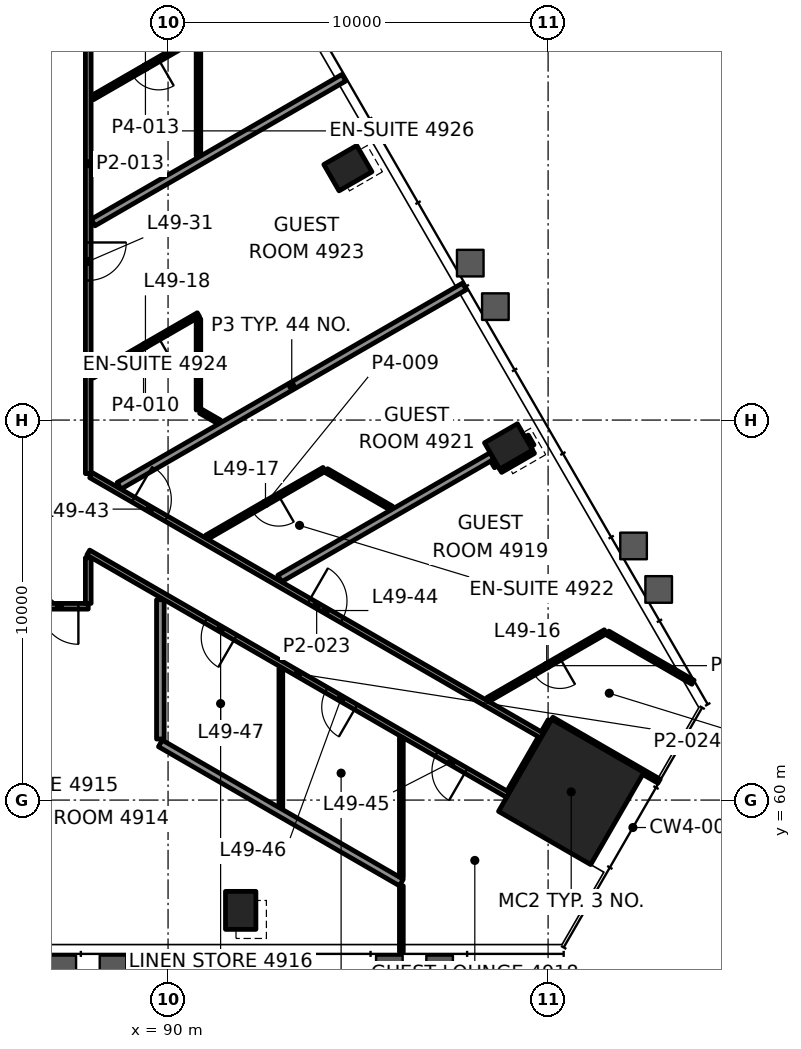
"""IFC4 building model, lengths in metres.
Left out: names, types, materials, properties, quantities, classifications, styles, units other than length and angle.
Written with IfcOpenShell. Run it as: python <this file> out.ifc"""

import sys

from ifc_helpers import new_model, si_unit, direction, frame, frame_2d, origin, origin_2d, place, context, subcontext, project, spatial, rectangle, hollow_rectangle, extrude, element, fill, save


model = new_model("IFC4")
c1 = context("Model", 3, precision=1e-05, world=origin(), true_north=direction((0.0, 1.0)))
c2 = subcontext(c1, "Body", "Model", "MODEL_VIEW")
j1 = project(units=[si_unit("LENGTHUNIT", "METRE"), si_unit("PLANEANGLEUNIT", "RADIAN")], contexts=[c1])
p1 = place(None, origin())
s1 = spatial("IfcSite", under=j1, at=p1, CompositionType="ELEMENT")
p2 = place(p1, origin())
s2 = spatial("IfcBuilding", under=s1, at=p2, CompositionType="ELEMENT")
p3 = place(p2, frame((0.0, 0.0, 210.4)))
s3 = spatial("IfcBuildingStorey", under=s2, at=p3, CompositionType="ELEMENT", Elevation=210.4)
p4 = place(p3, frame((100.608, 60.215, 0.0), z_axis=(0.0, 0.0, 1.0), x_axis=(0.5, 0.866025403784, 0.0)))
e1 = element("IfcColumn", 1, at=p4, inside=s3, PredefinedType="COLUMN", context=c2, shape_type="SweptSolid", body=[
    extrude(rectangle(XDim=2.8, YDim=2.8, at=origin_2d()), origin(), (0.0, 0.0, 1.0), 3.9),
])
for number, where, z_axis, x_axis in (
    (2, (91.911, 57.097, -0.0), (0.0, 0.0, 1.0), (1.0, 0.0, 0.0)),
    (3, (98.96, 69.306, -0.0), (0.0, 0.0, 1.0), (-0.5, 0.866, 0.0)),
    (4, (94.732, 76.628, -0.0), (0.0, 0.0, 1.0), (-0.5, 0.866, 0.0)),
):
    element("IfcColumn", number, at=place(p3, frame(where, z_axis=z_axis, x_axis=x_axis)), inside=s3, PredefinedType="COLUMN", context=c2, shape_type="SweptSolid", body=[
        extrude(hollow_rectangle(XDim=0.8, YDim=1.0, WallThickness=0.05, at=origin_2d()), origin(), (0.0, 0.0, 1.0), 3.9),
    ])
p5 = place(p3, frame((87.899, 65.1, 0.0), z_axis=(0.0, 0.0, 1.0), x_axis=(-1.0, 0.0, 0.0)))
e5 = element("IfcWall", 5, at=p5, inside=s3, PredefinedType="PARTITIONING", context=c2, shape_type="SweptSolid", body=[
    extrude(rectangle(XDim=25.799, YDim=0.15, at=frame_2d((12.899, 0.0))), origin(), (0.0, 0.0, 1.0), 3.1),
])
p6 = place(p5, frame((0.259, 0.0, 0.0)))
e6 = element("IfcOpeningElement", 6, at=p6, cuts=e5, PredefinedType="OPENING", context=c2, shape_type="SweptSolid", body=[
    extrude(rectangle(XDim=1.0, YDim=2.1, at=frame_2d((0.5, 1.05))), frame((0.0, 0.085, 0.0), z_axis=(0.0, -1.0, 0.0), x_axis=(1.0, 0.0, 0.0)), (0.0, 0.0, 1.0), 0.17),
])
p7 = place(p5, frame((4.641, 0.0, 0.0)))
e7 = element("IfcOpeningElement", 7, at=p7, cuts=e5, PredefinedType="OPENING", context=c2, shape_type="SweptSolid", body=[
    extrude(rectangle(XDim=1.0, YDim=2.1, at=frame_2d((0.5, 1.05))), frame((0.0, 0.085, 0.0), z_axis=(0.0, -1.0, 0.0), x_axis=(1.0, 0.0, 0.0)), (0.0, 0.0, 1.0), 0.17),
])
p8 = place(p5, frame((8.868, 0.0, 0.0)))
e8 = element("IfcOpeningElement", 8, at=p8, cuts=e5, PredefinedType="OPENING", context=c2, shape_type="SweptSolid", body=[
    extrude(rectangle(XDim=1.0, YDim=2.1, at=frame_2d((0.5, 1.05))), frame((0.0, 0.085, 0.0), z_axis=(0.0, -1.0, 0.0), x_axis=(1.0, 0.0, 0.0)), (0.0, 0.0, 1.0), 0.17),
])
p9 = place(p5, frame((13.271, 0.0, 0.0)))
e9 = element("IfcOpeningElement", 9, at=p9, cuts=e5, PredefinedType="OPENING", context=c2, shape_type="SweptSolid", body=[
    extrude(rectangle(XDim=1.0, YDim=2.1, at=frame_2d((0.5, 1.05))), frame((0.0, 0.085, 0.0), z_axis=(0.0, -1.0, 0.0), x_axis=(1.0, 0.0, 0.0)), (0.0, 0.0, 1.0), 0.17),
])
p10 = place(p5, frame((19.612, 0.0, 0.0)))
e10 = element("IfcOpeningElement", 10, at=p10, cuts=e5, PredefinedType="OPENING", context=c2, shape_type="SweptSolid", body=[
    extrude(rectangle(XDim=1.0, YDim=2.1, at=frame_2d((0.5, 1.05))), frame((0.0, 0.085, 0.0), z_axis=(0.0, -1.0, 0.0), x_axis=(1.0, 0.0, 0.0)), (0.0, 0.0, 1.0), 0.17),
])
p11 = place(p3, frame((101.509, 64.429, 0.0), z_axis=(0.0, 0.0, 1.0), x_axis=(-0.866028357664, -0.499994883695, 0.0)))
e11 = element("IfcWall", 11, at=p11, inside=s3, PredefinedType="PARTITIONING", context=c2, shape_type="SweptSolid", body=[
    extrude(rectangle(XDim=3.568, YDim=0.12, at=frame_2d((1.784, 0.0))), origin(), (0.0, 0.0, 1.0), 3.1),
])
p12 = place(p11, frame((1.384, 0.0, 0.0)))
e12 = element("IfcOpeningElement", 12, at=p12, cuts=e11, PredefinedType="OPENING", context=c2, shape_type="SweptSolid", body=[
    extrude(rectangle(XDim=0.8, YDim=2.1, at=frame_2d((0.4, 1.05))), frame((0.0, 0.07, 0.0), z_axis=(0.0, -1.0, 0.0), x_axis=(1.0, 0.0, 0.0)), (0.0, 0.0, 1.0), 0.14),
])
p13 = place(p3, frame((98.727, 68.71, 0.0), z_axis=(0.0, 0.0, 1.0), x_axis=(0.866083827272, 0.499898793895, 0.0)))
e13 = element("IfcWall", 13, at=p13, inside=s3, PredefinedType="PARTITIONING", context=c2, shape_type="SweptSolid", body=[
    extrude(rectangle(XDim=0.999, YDim=0.2, at=frame_2d((0.5, 0.0))), origin(), (0.0, 0.0, 1.0), 3.1),
])
p14 = place(p3, frame((92.938, 65.83, 0.0), z_axis=(0.0, 0.0, 1.0), x_axis=(0.866041300655, 0.499972464802, 0.0)))
e14 = element("IfcWall", 14, at=p14, inside=s3, PredefinedType="PARTITIONING", context=c2, shape_type="SweptSolid", body=[
    extrude(rectangle(XDim=6.452, YDim=0.2, at=frame_2d((3.226, 0.0))), origin(), (0.0, 0.0, 1.0), 3.1),
])
p15 = place(p3, frame((94.109, 68.702, 0.0), z_axis=(0.0, 0.0, 1.0), x_axis=(-0.866028357664, -0.499994883695, 0.0)))
e15 = element("IfcWall", 15, at=p15, inside=s3, PredefinedType="PARTITIONING", context=c2, shape_type="SweptSolid", body=[
    extrude(rectangle(XDim=3.568, YDim=0.12, at=frame_2d((1.784, 0.0))), origin(), (0.0, 0.0, 1.0), 3.1),
])
p16 = place(p15, frame((1.384, 0.0, 0.0)))
e16 = element("IfcOpeningElement", 16, at=p16, cuts=e15, PredefinedType="OPENING", context=c2, shape_type="SweptSolid", body=[
    extrude(rectangle(XDim=0.8, YDim=2.1, at=frame_2d((0.4, 1.05))), frame((0.0, 0.07, 0.0), z_axis=(0.0, -1.0, 0.0), x_axis=(1.0, 0.0, 0.0)), (0.0, 0.0, 1.0), 0.14),
])
p17 = place(p3, frame((88.711, 68.27, 0.0), z_axis=(0.0, 0.0, 1.0), x_axis=(0.86602828922, 0.499995002246, 0.0)))
e17 = element("IfcWall", 17, at=p17, inside=s3, PredefinedType="PARTITIONING", context=c2, shape_type="SweptSolid", body=[
    extrude(rectangle(XDim=10.494, YDim=0.2, at=frame_2d((5.247, 0.0))), origin(), (0.0, 0.0, 1.0), 3.022),
])
p18 = place(p3, frame((90.8, 72.771, 0.0), z_axis=(0.0, 0.0, 1.0), x_axis=(-0.86604299788, -0.499969524894, 0.0)))
e18 = element("IfcWall", 18, at=p18, inside=s3, PredefinedType="PARTITIONING", context=c2, shape_type="SweptSolid", body=[
    extrude(rectangle(XDim=3.222, YDim=0.12, at=frame_2d((1.611, 0.0))), origin(), (0.0, 0.0, 1.0), 3.1),
])
p19 = place(p18, frame((1.211, 0.0, 0.0)))
e19 = element("IfcOpeningElement", 19, at=p19, cuts=e18, PredefinedType="OPENING", context=c2, shape_type="SweptSolid", body=[
    extrude(rectangle(XDim=0.8, YDim=2.1, at=frame_2d((0.4, 1.05))), frame((0.0, 0.07, 0.0), z_axis=(0.0, -1.0, 0.0), x_axis=(1.0, 0.0, 0.0)), (0.0, 0.0, 1.0), 0.14),
])
p20 = place(p3, frame((88.027, 75.198, 0.0), z_axis=(0.0, 0.0, 1.0), x_axis=(0.866028758719, 0.499994189038, 0.0)))
e20 = element("IfcWall", 20, at=p20, inside=s3, PredefinedType="PARTITIONING", context=c2, shape_type="SweptSolid", body=[
    extrude(rectangle(XDim=7.622, YDim=0.2, at=frame_2d((3.811, 0.0))), origin(), (0.0, 0.0, 1.0), 3.022),
])
p21 = place(p3, frame((90.8, 80.095, 0.0), z_axis=(0.0, 0.0, 1.0), x_axis=(-0.866029130051, -0.499993545862, 0.0)))
e21 = element("IfcWall", 21, at=p21, inside=s3, PredefinedType="PARTITIONING", context=c2, shape_type="SweptSolid", body=[
    extrude(rectangle(XDim=3.222, YDim=0.12, at=frame_2d((1.611, 0.0))), origin(), (0.0, 0.0, 1.0), 3.1),
])
p22 = place(p21, frame((1.211, 0.0, 0.0)))
e22 = element("IfcOpeningElement", 22, at=p22, cuts=e21, PredefinedType="OPENING", context=c2, shape_type="SweptSolid", body=[
    extrude(rectangle(XDim=0.8, YDim=2.1, at=frame_2d((0.4, 1.05))), frame((0.0, 0.07, 0.0), z_axis=(0.0, -1.0, 0.0), x_axis=(1.0, 0.0, 0.0)), (0.0, 0.0, 1.0), 0.14),
])
p23 = place(p3, frame((98.984, 60.201, 0.0), z_axis=(0.0, 0.0, 1.0), x_axis=(0.499991515992, 0.866030301974, 0.0)))
e23 = element("IfcWall", 23, at=p23, inside=s3, PredefinedType="PARTITIONING", context=c2, shape_type="SweptSolid", body=[
    extrude(rectangle(XDim=1.649, YDim=0.15, at=frame_2d((0.825, 0.0))), origin(), (0.0, 0.0, 1.0), 2.947),
])
p24 = place(p3, frame((96.139, 55.998, 0.0), z_axis=(0.0, 0.0, 1.0), x_axis=(0.0, 1.0, 0.0)))
e24 = element("IfcWall", 24, at=p24, inside=s3, PredefinedType="PARTITIONING", context=c2, shape_type="SweptSolid", body=[
    extrude(rectangle(XDim=1.746, YDim=0.1, at=frame_2d((0.873, 0.0))), origin(), (0.0, 0.0, 1.0), 3.1),
])
p25 = place(p3, frame((92.968, 59.806, 0.0), z_axis=(0.0, 0.0, 1.0), x_axis=(0.0, 1.0, 0.0)))
e25 = element("IfcWall", 25, at=p25, inside=s3, PredefinedType="PARTITIONING", context=c2, shape_type="SweptSolid", body=[
    extrude(rectangle(XDim=3.664, YDim=0.1, at=frame_2d((1.832, 0.0))), origin(), (0.0, 0.0, 1.0), 3.1),
])
p26 = place(p3, frame((90.8, 70.266, 0.0), z_axis=(0.0, 0.0, 1.0), x_axis=(0.0, 1.0, 0.0)))
e26 = element("IfcWall", 26, at=p26, inside=s3, PredefinedType="PARTITIONING", context=c2, shape_type="SweptSolid", body=[
    extrude(rectangle(XDim=2.397, YDim=0.12, at=frame_2d((1.198, 0.0))), origin(), (0.0, 0.0, 1.0), 3.1),
])
p27 = place(p3, frame((90.8, 76.955, 0.0), z_axis=(0.0, 0.0, 1.0), x_axis=(0.0, 1.0, 0.0)))
e27 = element("IfcWall", 27, at=p27, inside=s3, PredefinedType="PARTITIONING", context=c2, shape_type="SweptSolid", body=[
    extrude(rectangle(XDim=3.031, YDim=0.12, at=frame_2d((1.515, 0.0))), origin(), (0.0, 0.0, 1.0), 3.1),
])
p28 = place(p3, frame((89.797, 61.607, 0.0), z_axis=(0.0, 0.0, 1.0), x_axis=(0.0, 1.0, 0.0)))
e28 = element("IfcWall", 28, at=p28, inside=s3, PredefinedType="PARTITIONING", context=c2, shape_type="SweptSolid", body=[
    extrude(rectangle(XDim=3.664, YDim=0.2, at=frame_2d((1.832, 0.0))), origin(), (0.0, 0.0, 1.0), 2.947),
])
p29 = place(p3, frame((87.9, 65.176, 0.0), z_axis=(0.0, 0.0, 1.0), x_axis=(0.0, 1.0, 0.0)))
e29 = element("IfcWall", 29, at=p29, inside=s3, PredefinedType="PARTITIONING", context=c2, shape_type="SweptSolid", body=[
    extrude(rectangle(XDim=1.201, YDim=0.15, at=frame_2d((0.6, 0.0))), origin(), (0.0, 0.0, 1.0), 2.947),
])
p30 = place(p3, frame((87.9, 84.9, 0.0), z_axis=(0.0, 0.0, 1.0), x_axis=(0.0, -1.0, 0.0)))
e30 = element("IfcWall", 30, at=p30, inside=s3, PredefinedType="PARTITIONING", context=c2, shape_type="SweptSolid", body=[
    extrude(rectangle(XDim=16.309, YDim=0.15, at=frame_2d((8.154, 0.0))), origin(), (0.0, 0.0, 1.0), 3.1),
])
p31 = place(p30, frame((2.904, 0.0, 0.0)))
e31 = element("IfcOpeningElement", 31, at=p31, cuts=e30, PredefinedType="OPENING", context=c2, shape_type="SweptSolid", body=[
    extrude(rectangle(XDim=1.0, YDim=2.1, at=frame_2d((0.5, 1.05))), frame((0.0, 0.085, 0.0), z_axis=(0.0, -1.0, 0.0), x_axis=(1.0, 0.0, 0.0)), (0.0, 0.0, 1.0), 0.17),
])
p32 = place(p30, frame((10.227, 0.0, 0.0)))
e32 = element("IfcOpeningElement", 32, at=p32, cuts=e30, PredefinedType="OPENING", context=c2, shape_type="SweptSolid", body=[
    extrude(rectangle(XDim=1.0, YDim=2.1, at=frame_2d((0.5, 1.05))), frame((0.0, 0.085, 0.0), z_axis=(0.0, -1.0, 0.0), x_axis=(1.0, 0.0, 0.0)), (0.0, 0.0, 1.0), 0.17),
])
p33 = place(p3, frame((99.542, 69.296, 0.0), z_axis=(0.0, 0.0, 1.0), x_axis=(-0.500005339912, 0.866022320763, 0.0)))
e33 = element("IfcWall", 33, at=p33, inside=s3, PredefinedType="PARTITIONING", context=c2, shape_type="SweptSolid", body=[
    extrude(rectangle(XDim=0.299, YDim=0.2, at=frame_2d((0.149, 0.0))), origin(), (0.0, 0.0, 1.0), 3.1),
])
p34 = place(p3, frame((98.676, 68.796, 0.0), z_axis=(0.0, 0.0, 1.0), x_axis=(-0.4999705729, 0.866042392862, 0.0)))
e34 = element("IfcWall", 34, at=p34, inside=s3, PredefinedType="PARTITIONING", context=c2, shape_type="SweptSolid", body=[
    extrude(rectangle(XDim=0.199, YDim=0.2, at=frame_2d((0.099, 0.0))), origin(), (0.0, 0.0, 1.0), 3.1),
])
p35 = place(p3, frame((103.813, 63.099, 0.0), z_axis=(0.0, 0.0, 1.0), x_axis=(-0.866025553686, 0.499999740363, 0.0)))
e35 = element("IfcWall", 35, at=p35, inside=s3, PredefinedType="PARTITIONING", context=c2, shape_type="SweptSolid", body=[
    extrude(rectangle(XDim=2.591, YDim=0.12, at=frame_2d((1.296, 0.0))), origin(), (0.0, 0.0, 1.0), 3.1),
])
p36 = place(p3, frame((95.877, 67.681, 0.0), z_axis=(0.0, 0.0, 1.0), x_axis=(-0.866002090371, 0.500040377843, 0.0)))
e36 = element("IfcWall", 36, at=p36, inside=s3, PredefinedType="PARTITIONING", context=c2, shape_type="SweptSolid", body=[
    extrude(rectangle(XDim=1.972, YDim=0.12, at=frame_2d((0.986, 0.0))), origin(), (0.0, 0.0, 1.0), 3.1),
])
p37 = place(p3, frame((91.349, 69.949, 0.0), z_axis=(0.0, 0.0, 1.0), x_axis=(-0.865998287773, 0.500046963369, 0.0)))
e37 = element("IfcWall", 37, at=p37, inside=s3, PredefinedType="PARTITIONING", context=c2, shape_type="SweptSolid", body=[
    extrude(rectangle(XDim=0.564, YDim=0.12, at=frame_2d((0.282, 0.0))), origin(), (0.0, 0.0, 1.0), 3.1),
])
p38 = place(p3, frame((102.919, 60.498, 0.0), z_axis=(0.0, 0.0, 1.0), x_axis=(-0.866003472149, 0.500037984783, 0.0)))
e38 = element("IfcWall", 38, at=p38, inside=s3, PredefinedType="PARTITIONING", context=c2, shape_type="SweptSolid", body=[
    extrude(rectangle(XDim=3.26, YDim=0.12, at=frame_2d((1.63, 0.0))), origin(), (0.0, 0.0, 1.0), 3.1),
])
p39 = place(p3, frame((87.975, 68.548, 0.0), z_axis=(0.0, 0.0, 1.0), x_axis=(0.866024823711, -0.500001004715, 0.0)))
e39 = element("IfcWall", 39, at=p39, inside=s3, PredefinedType="PARTITIONING", context=c2, shape_type="SweptSolid", body=[
    extrude(rectangle(XDim=13.707, YDim=0.15, at=frame_2d((6.854, 0.0))), origin(), (0.0, 0.0, 1.0), 3.1),
])
p40 = place(p39, frame((1.283, 0.0, 0.0)))
e40 = element("IfcOpeningElement", 40, at=p40, cuts=e39, PredefinedType="OPENING", context=c2, shape_type="SweptSolid", body=[
    extrude(rectangle(XDim=1.0, YDim=2.1, at=frame_2d((0.5, 1.05))), frame((0.0, 0.085, 0.0), z_axis=(0.0, -1.0, 0.0), x_axis=(1.0, 0.0, 0.0)), (0.0, 0.0, 1.0), 0.17),
])
p41 = place(p39, frame((6.62, 0.0, 0.0)))
e41 = element("IfcOpeningElement", 41, at=p41, cuts=e39, PredefinedType="OPENING", context=c2, shape_type="SweptSolid", body=[
    extrude(rectangle(XDim=1.0, YDim=2.1, at=frame_2d((0.5, 1.05))), frame((0.0, 0.085, 0.0), z_axis=(0.0, -1.0, 0.0), x_axis=(1.0, 0.0, 0.0)), (0.0, 0.0, 1.0), 0.17),
])
p42 = place(p3, frame((98.945, 60.136, 0.0), z_axis=(0.0, 0.0, 1.0), x_axis=(-0.866024604137, 0.500001385028, 0.0)))
e42 = element("IfcWall", 42, at=p42, inside=s3, PredefinedType="PARTITIONING", context=c2, shape_type="SweptSolid", body=[
    extrude(rectangle(XDim=12.754, YDim=0.15, at=frame_2d((6.377, 0.0))), origin(), (0.0, 0.0, 1.0), 2.947),
])
p43 = place(p42, frame((1.271, 0.0, 0.0)))
e43 = element("IfcOpeningElement", 43, at=p43, cuts=e42, PredefinedType="OPENING", context=c2, shape_type="SweptSolid", body=[
    extrude(rectangle(XDim=0.9, YDim=2.1, at=frame_2d((0.45, 1.05))), frame((0.0, 0.085, 0.0), z_axis=(0.0, -1.0, 0.0), x_axis=(1.0, 0.0, 0.0)), (0.0, 0.0, 1.0), 0.17),
])
p44 = place(p42, frame((4.621, 0.0, 0.0)))
e44 = element("IfcOpeningElement", 44, at=p44, cuts=e42, PredefinedType="OPENING", context=c2, shape_type="SweptSolid", body=[
    extrude(rectangle(XDim=0.9, YDim=2.1, at=frame_2d((0.45, 1.05))), frame((0.0, 0.085, 0.0), z_axis=(0.0, -1.0, 0.0), x_axis=(1.0, 0.0, 0.0)), (0.0, 0.0, 1.0), 0.17),
])
p45 = place(p42, frame((8.282, 0.0, 0.0)))
e45 = element("IfcOpeningElement", 45, at=p45, cuts=e42, PredefinedType="OPENING", context=c2, shape_type="SweptSolid", body=[
    extrude(rectangle(XDim=0.9, YDim=2.1, at=frame_2d((0.45, 1.05))), frame((0.0, 0.085, 0.0), z_axis=(0.0, -1.0, 0.0), x_axis=(1.0, 0.0, 0.0)), (0.0, 0.0, 1.0), 0.17),
])
p46 = place(p3, frame((96.139, 57.83, 0.0), z_axis=(0.0, 0.0, 1.0), x_axis=(-0.866014584968, 0.500018738272, 0.0)))
e46 = element("IfcWall", 46, at=p46, inside=s3, PredefinedType="PARTITIONING", context=c2, shape_type="SweptSolid", body=[
    extrude(rectangle(XDim=7.323, YDim=0.2, at=frame_2d((3.662, 0.0))), origin(), (0.0, 0.0, 1.0), 3.1),
])
p47 = place(p3, frame((99.884, 61.76, 0.0), z_axis=(0.0, 0.0, 1.0), x_axis=(0.500031897912, 0.866006986733, 0.0)))
e47 = element("IfcWall", 47, at=p47, inside=s3, PredefinedType="PARTITIONING", context=c2, shape_type="SweptSolid", body=[
    extrude(rectangle(XDim=0.364, YDim=0.15, at=frame_2d((0.182, 0.0))), origin(), (0.0, 0.0, 1.0), 3.1),
])
p48 = place(p3, frame((96.139, 57.975, 0.0), z_axis=(0.0, 0.0, 1.0), x_axis=(0.0, 1.0, 0.0)))
e48 = element("IfcWall", 48, at=p48, inside=s3, PredefinedType="PARTITIONING", context=c2, shape_type="SweptSolid", body=[
    extrude(rectangle(XDim=3.665, YDim=0.1, at=frame_2d((1.833, 0.0))), origin(), (0.0, 0.0, 1.0), 3.1),
])
p49 = place(p6, origin())
e49 = element("IfcDoor", 49, at=p49, inside=s3, OperationType="SINGLE_SWING_RIGHT", PredefinedType="DOOR", context=c2, shape_type="SweptSolid", body=[
    extrude(rectangle(XDim=1.0, YDim=2.1, at=frame_2d((0.5, 1.05))), frame((0.0, 0.025, 0.0), z_axis=(0.0, -1.0, 0.0), x_axis=(1.0, 0.0, 0.0)), (0.0, 0.0, 1.0), 0.05),
])
fill(e6, e49)
p50 = place(p12, origin())
e50 = element("IfcDoor", 50, at=p50, inside=s3, OperationType="SINGLE_SWING_RIGHT", PredefinedType="DOOR", context=c2, shape_type="SweptSolid", body=[
    extrude(rectangle(XDim=0.8, YDim=2.1, at=frame_2d((0.4, 1.05))), frame((0.0, 0.025, 0.0), z_axis=(0.0, -1.0, 0.0), x_axis=(1.0, 0.0, 0.0)), (0.0, 0.0, 1.0), 0.05),
])
fill(e12, e50)
p51 = place(p16, origin())
e51 = element("IfcDoor", 51, at=p51, inside=s3, OperationType="SINGLE_SWING_RIGHT", PredefinedType="DOOR", context=c2, shape_type="SweptSolid", body=[
    extrude(rectangle(XDim=0.8, YDim=2.1, at=frame_2d((0.4, 1.05))), frame((0.0, 0.025, 0.0), z_axis=(0.0, -1.0, 0.0), x_axis=(1.0, 0.0, 0.0)), (0.0, 0.0, 1.0), 0.05),
])
fill(e16, e51)
p52 = place(p19, origin())
e52 = element("IfcDoor", 52, at=p52, inside=s3, OperationType="SINGLE_SWING_RIGHT", PredefinedType="DOOR", context=c2, shape_type="SweptSolid", body=[
    extrude(rectangle(XDim=0.8, YDim=2.1, at=frame_2d((0.4, 1.05))), frame((0.0, 0.025, 0.0), z_axis=(0.0, -1.0, 0.0), x_axis=(1.0, 0.0, 0.0)), (0.0, 0.0, 1.0), 0.05),
])
fill(e19, e52)
p53 = place(p22, origin())
e53 = element("IfcDoor", 53, at=p53, inside=s3, OperationType="SINGLE_SWING_RIGHT", PredefinedType="DOOR", context=c2, shape_type="SweptSolid", body=[
    extrude(rectangle(XDim=0.8, YDim=2.1, at=frame_2d((0.4, 1.05))), frame((0.0, 0.025, 0.0), z_axis=(0.0, -1.0, 0.0), x_axis=(1.0, 0.0, 0.0)), (0.0, 0.0, 1.0), 0.05),
])
fill(e22, e53)
p54 = place(p32, origin())
e54 = element("IfcDoor", 54, at=p54, inside=s3, OperationType="SINGLE_SWING_LEFT", PredefinedType="DOOR", context=c2, shape_type="SweptSolid", body=[
    extrude(rectangle(XDim=1.0, YDim=2.1, at=frame_2d((0.5, 1.05))), frame((0.0, 0.025, 0.0), z_axis=(0.0, -1.0, 0.0), x_axis=(1.0, 0.0, 0.0)), (0.0, 0.0, 1.0), 0.05),
])
fill(e32, e54)
p55 = place(p40, origin())
e55 = element("IfcDoor", 55, at=p55, inside=s3, OperationType="SINGLE_SWING_LEFT", PredefinedType="DOOR", context=c2, shape_type="SweptSolid", body=[
    extrude(rectangle(XDim=1.0, YDim=2.1, at=frame_2d((0.5, 1.05))), frame((0.0, 0.025, 0.0), z_axis=(0.0, -1.0, 0.0), x_axis=(1.0, 0.0, 0.0)), (0.0, 0.0, 1.0), 0.05),
])
fill(e40, e55)
p56 = place(p41, origin())
e56 = element("IfcDoor", 56, at=p56, inside=s3, OperationType="SINGLE_SWING_LEFT", PredefinedType="DOOR", context=c2, shape_type="SweptSolid", body=[
    extrude(rectangle(XDim=1.0, YDim=2.1, at=frame_2d((0.5, 1.05))), frame((0.0, 0.025, 0.0), z_axis=(0.0, -1.0, 0.0), x_axis=(1.0, 0.0, 0.0)), (0.0, 0.0, 1.0), 0.05),
])
fill(e41, e56)
p57 = place(p43, origin())
e57 = element("IfcDoor", 57, at=p57, inside=s3, OperationType="SINGLE_SWING_LEFT", PredefinedType="DOOR", context=c2, shape_type="SweptSolid", body=[
    extrude(rectangle(XDim=0.9, YDim=2.1, at=frame_2d((0.45, 1.05))), frame((0.0, 0.025, 0.0), z_axis=(0.0, -1.0, 0.0), x_axis=(1.0, 0.0, 0.0)), (0.0, 0.0, 1.0), 0.05),
])
fill(e43, e57)
p58 = place(p44, origin())
e58 = element("IfcDoor", 58, at=p58, inside=s3, OperationType="SINGLE_SWING_RIGHT", PredefinedType="DOOR", context=c2, shape_type="SweptSolid", body=[
    extrude(rectangle(XDim=0.9, YDim=2.1, at=frame_2d((0.45, 1.05))), frame((0.0, 0.025, 0.0), z_axis=(0.0, -1.0, 0.0), x_axis=(1.0, 0.0, 0.0)), (0.0, 0.0, 1.0), 0.05),
])
fill(e44, e58)
p59 = place(p45, origin())
e59 = element("IfcDoor", 59, at=p59, inside=s3, OperationType="SINGLE_SWING_LEFT", PredefinedType="DOOR", context=c2, shape_type="SweptSolid", body=[
    extrude(rectangle(XDim=0.9, YDim=2.1, at=frame_2d((0.45, 1.05))), frame((0.0, 0.025, 0.0), z_axis=(0.0, -1.0, 0.0), x_axis=(1.0, 0.0, 0.0)), (0.0, 0.0, 1.0), 0.05),
])
fill(e45, e59)
save(model, sys.argv[1])
